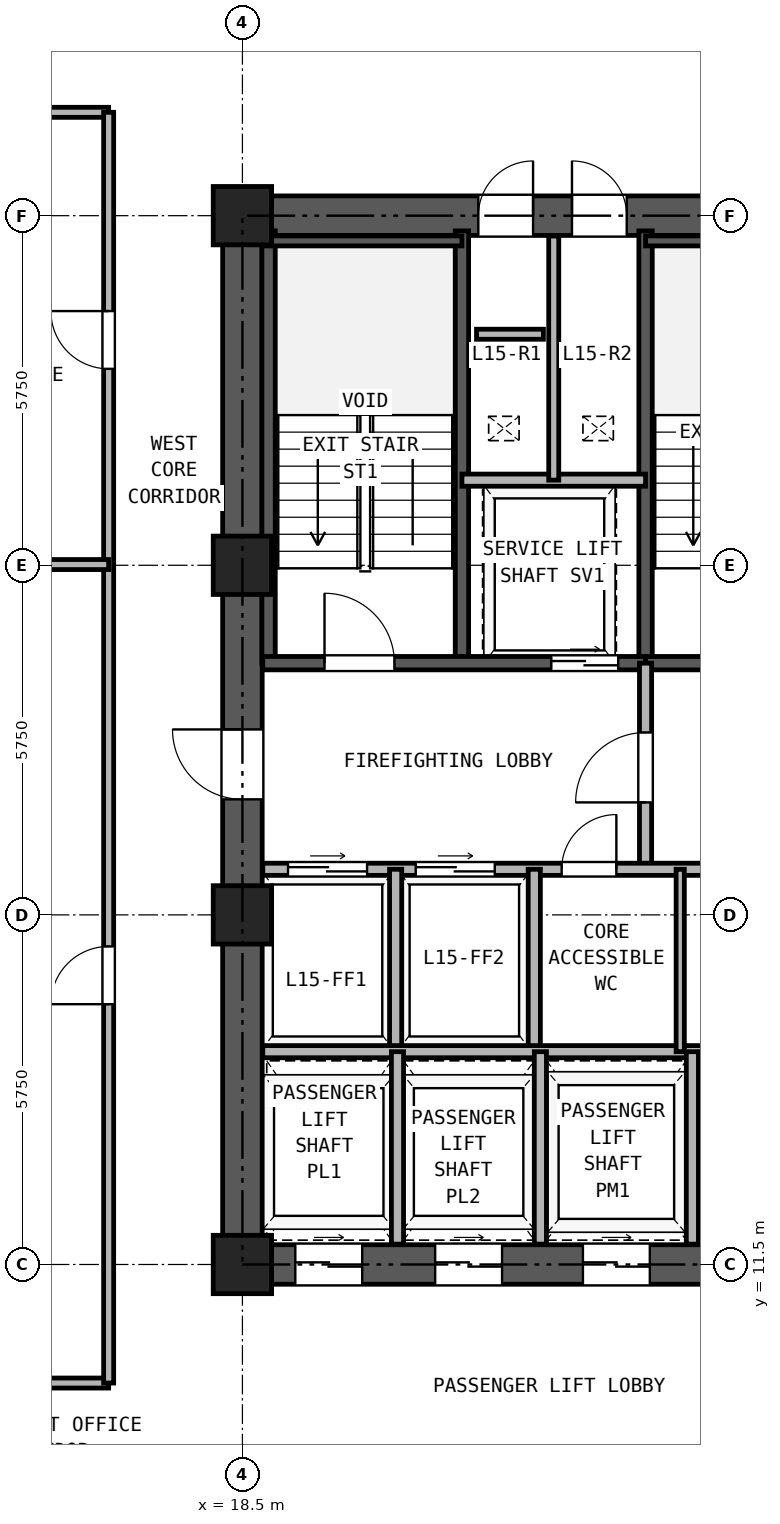
"""IFC4 building model, lengths in metres.
Left out: names, types, materials, properties, quantities, classifications, styles, units other than length and angle.
Written with IfcOpenShell. Run it as: python <this file> out.ifc"""

import sys

from ifc_helpers import new_model, si_unit, direction, frame, frame_2d, origin, origin_2d, place, context, subcontext, project, spatial, rectangle, hollow_rectangle, extrude, source, transform, mapped, element, fill, save


model = new_model("IFC4")
c1 = context("Model", 3, precision=1e-05, world=origin(), true_north=direction((0.0, 1.0)))
c2 = subcontext(c1, "Body", "Model", "MODEL_VIEW")
j1 = project(units=[si_unit("LENGTHUNIT", "METRE"), si_unit("PLANEANGLEUNIT", "RADIAN")], contexts=[c1])
p1 = place(None, origin())
s1 = spatial("IfcSite", under=j1, at=p1, CompositionType="ELEMENT")
p2 = place(p1, origin())
s2 = spatial("IfcBuilding", under=s1, at=p2, CompositionType="ELEMENT")
p3 = place(p2, frame((0.0, 0.0, 58.5)))
s3 = spatial("IfcBuildingStorey", under=s2, at=p3, CompositionType="ELEMENT", Elevation=58.5)
m1 = source(origin(), c2, "Body", "SweptSolid", [
    extrude(hollow_rectangle(XDim=0.96, YDim=0.96, WallThickness=0.06, at=origin_2d()), origin(), (0.0, 0.0, 1.0), 3.32),
])
for number, where, z_axis, x_axis in (
    (1, (18.5, 11.5, 0.0), (0.0, 0.0, 1.0), (1.0, 0.0, 0.0)),
    (2, (18.5, 17.25, 0.0), (0.0, 0.0, 1.0), (1.0, 0.0, 0.0)),
    (3, (18.5, 23.0, 0.0), (0.0, 0.0, 1.0), (1.0, 0.0, 0.0)),
    (4, (18.5, 28.75, 0.0), (0.0, 0.0, 1.0), (1.0, 0.0, 0.0)),
):
    element("IfcColumn", number, at=place(p3, frame(where, z_axis=z_axis, x_axis=x_axis)), inside=s3, PredefinedType="COLUMN", context=c2, shape_type="MappedRepresentation", body=[
        mapped(m1, transform((0.0, 0.0, 0.0), x_axis=(1.0, 0.0, 0.0), y_axis=(0.0, 1.0, 0.0), z_axis=(0.0, 0.0, 1.0), scale=1.0)),
    ])
p4 = place(p3, frame((18.175, 11.5, 0.0), z_axis=(0.0, 0.0, 1.0), x_axis=(1.0, 0.0, 0.0)))
e5 = element("IfcWall", 5, at=p4, inside=s3, PredefinedType="SHEAR", context=c2, shape_type="SweptSolid", body=[
    extrude(rectangle(XDim=10.65, YDim=0.65, at=frame_2d((5.325, 0.0))), origin(), (0.0, 0.0, 1.0), 3.32),
])
p5 = place(p4, frame((1.195, 0.0, 0.0)))
e6 = element("IfcOpeningElement", 6, at=p5, cuts=e5, PredefinedType="OPENING", context=c2, shape_type="SweptSolid", body=[
    extrude(rectangle(XDim=1.1, YDim=2.25, at=frame_2d((0.55, 1.125))), frame((0.0, 0.335, 0.0), z_axis=(0.0, -1.0, 0.0), x_axis=(1.0, 0.0, 0.0)), (0.0, 0.0, 1.0), 0.67),
])
p6 = place(p4, frame((3.495, 0.0, 0.0)))
e7 = element("IfcOpeningElement", 7, at=p6, cuts=e5, PredefinedType="OPENING", context=c2, shape_type="SweptSolid", body=[
    extrude(rectangle(XDim=1.1, YDim=2.25, at=frame_2d((0.55, 1.125))), frame((0.0, 0.335, 0.0), z_axis=(0.0, -1.0, 0.0), x_axis=(1.0, 0.0, 0.0)), (0.0, 0.0, 1.0), 0.67),
])
p7 = place(p4, frame((5.925, 0.0, 0.0)))
e8 = element("IfcOpeningElement", 8, at=p7, cuts=e5, PredefinedType="OPENING", context=c2, shape_type="SweptSolid", body=[
    extrude(rectangle(XDim=1.1, YDim=2.25, at=frame_2d((0.55, 1.125))), frame((0.0, 0.335, 0.0), z_axis=(0.0, -1.0, 0.0), x_axis=(1.0, 0.0, 0.0)), (0.0, 0.0, 1.0), 0.67),
])
p8 = place(p4, frame((8.325, 0.0, 0.0)))
e9 = element("IfcOpeningElement", 9, at=p8, cuts=e5, PredefinedType="OPENING", context=c2, shape_type="SweptSolid", body=[
    extrude(rectangle(XDim=1.1, YDim=2.25, at=frame_2d((0.55, 1.125))), frame((0.0, 0.335, 0.0), z_axis=(0.0, -1.0, 0.0), x_axis=(1.0, 0.0, 0.0)), (0.0, 0.0, 1.0), 0.67),
])
p9 = place(p3, frame((18.175, 28.75, 0.0), z_axis=(0.0, 0.0, 1.0), x_axis=(1.0, 0.0, 0.0)))
e10 = element("IfcWall", 10, at=p9, inside=s3, PredefinedType="SHEAR", context=c2, shape_type="SweptSolid", body=[
    extrude(rectangle(XDim=10.65, YDim=0.65, at=frame_2d((5.325, 0.0))), origin(), (0.0, 0.0, 1.0), 3.32),
])
p10 = place(p9, frame((4.205, 0.0, 0.0)))
e11 = element("IfcOpeningElement", 11, at=p10, cuts=e10, PredefinedType="OPENING", context=c2, shape_type="SweptSolid", body=[
    extrude(rectangle(XDim=0.9, YDim=2.05, at=frame_2d((0.45, 1.025))), frame((0.0, 0.335, 0.0), z_axis=(0.0, -1.0, 0.0), x_axis=(1.0, 0.0, 0.0)), (0.0, 0.0, 1.0), 0.67),
])
p11 = place(p9, frame((5.745, 0.0, 0.0)))
e12 = element("IfcOpeningElement", 12, at=p11, cuts=e10, PredefinedType="OPENING", context=c2, shape_type="SweptSolid", body=[
    extrude(rectangle(XDim=0.9, YDim=2.05, at=frame_2d((0.45, 1.025))), frame((0.0, 0.335, 0.0), z_axis=(0.0, -1.0, 0.0), x_axis=(1.0, 0.0, 0.0)), (0.0, 0.0, 1.0), 0.67),
])
p12 = place(p3, frame((18.5, 11.825, 0.0), z_axis=(0.0, 0.0, 1.0), x_axis=(0.0, 1.0, 0.0)))
e13 = element("IfcWall", 13, at=p12, inside=s3, PredefinedType="SHEAR", context=c2, shape_type="SweptSolid", body=[
    extrude(rectangle(XDim=16.6, YDim=0.65, at=frame_2d((8.3, 0.0))), origin(), (0.0, 0.0, 1.0), 3.32),
])
p13 = place(p12, frame((7.325, 0.0, 0.0)))
e14 = element("IfcOpeningElement", 14, at=p13, cuts=e13, PredefinedType="OPENING", context=c2, shape_type="SweptSolid", body=[
    extrude(rectangle(XDim=1.15, YDim=2.2, at=frame_2d((0.575, 1.1))), frame((0.0, 0.335, 0.0), z_axis=(0.0, -1.0, 0.0), x_axis=(1.0, 0.0, 0.0)), (0.0, 0.0, 1.0), 0.67),
])
for number, where, z_axis, x_axis in (
    (15, (18.93, 21.39, 0.0), (0.0, 0.0, 1.0), (0.0, 1.0, 0.0)),
    (16, (22.11, 21.39, 0.0), (0.0, 0.0, 1.0), (0.0, 1.0, 0.0)),
    (17, (25.13, 21.39, 0.0), (0.0, 0.0, 1.0), (0.0, 1.0, 0.0)),
):
    element("IfcWall", number, at=place(p3, frame(where, z_axis=z_axis, x_axis=x_axis)), inside=s3, PredefinedType="SOLIDWALL", context=c2, shape_type="SweptSolid", body=[
        extrude(rectangle(XDim=7.11, YDim=0.22, at=frame_2d((3.555, 0.0))), origin(), (0.0, 0.0, 1.0), 3.32),
    ])
p14 = place(p3, frame((18.835, 28.335, 0.0), z_axis=(0.0, 0.0, 1.0), x_axis=(1.0, 0.0, 0.0)))
e18 = element("IfcWall", 18, at=p14, inside=s3, PredefinedType="PARTITIONING", context=c2, shape_type="SweptSolid", body=[
    extrude(rectangle(XDim=3.275, YDim=0.165, at=frame_2d((1.638, 0.0))), origin(), (0.0, 0.0, 1.0), 3.32),
])
p15 = place(p3, frame((25.13, 28.335, 0.0), z_axis=(0.0, 0.0, 1.0), x_axis=(1.0, 0.0, 0.0)))
e19 = element("IfcWall", 19, at=p15, inside=s3, PredefinedType="PARTITIONING", context=c2, shape_type="SweptSolid", body=[
    extrude(rectangle(XDim=3.035, YDim=0.165, at=frame_2d((1.518, 0.0))), origin(), (0.0, 0.0, 1.0), 3.32),
])
p16 = place(p3, frame((18.835, 21.39, 0.0), z_axis=(0.0, 0.0, 1.0), x_axis=(1.0, 0.0, 0.0)))
e20 = element("IfcWall", 20, at=p16, inside=s3, PredefinedType="SOLIDWALL", context=c2, shape_type="SweptSolid", body=[
    extrude(rectangle(XDim=6.295, YDim=0.22, at=frame_2d((3.147, 0.0))), origin(), (0.0, 0.0, 1.0), 3.32),
])
p17 = place(p16, frame((1.015, 0.0, 0.0)))
e21 = element("IfcOpeningElement", 21, at=p17, cuts=e20, PredefinedType="OPENING", context=c2, shape_type="SweptSolid", body=[
    extrude(rectangle(XDim=1.15, YDim=2.2, at=frame_2d((0.575, 1.1))), frame((0.0, 0.12, 0.0), z_axis=(0.0, -1.0, 0.0), x_axis=(1.0, 0.0, 0.0)), (0.0, 0.0, 1.0), 0.24),
])
p18 = place(p16, frame((4.745, 0.0, 0.0)))
e22 = element("IfcOpeningElement", 22, at=p18, cuts=e20, PredefinedType="OPENING", context=c2, shape_type="SweptSolid", body=[
    extrude(rectangle(XDim=1.1, YDim=2.25, at=frame_2d((0.55, 1.125))), frame((0.0, 0.12, 0.0), z_axis=(0.0, -1.0, 0.0), x_axis=(1.0, 0.0, 0.0)), (0.0, 0.0, 1.0), 0.24),
])
p19 = place(p3, frame((25.13, 21.39, 0.0), z_axis=(0.0, 0.0, 1.0), x_axis=(1.0, 0.0, 0.0)))
e23 = element("IfcWall", 23, at=p19, inside=s3, PredefinedType="SOLIDWALL", context=c2, shape_type="SweptSolid", body=[
    extrude(rectangle(XDim=3.035, YDim=0.22, at=frame_2d((1.518, 0.0))), origin(), (0.0, 0.0, 1.0), 3.32),
])
p20 = place(p19, frame((0.92, 0.0, 0.0)))
e24 = element("IfcOpeningElement", 24, at=p20, cuts=e23, PredefinedType="OPENING", context=c2, shape_type="SweptSolid", body=[
    extrude(rectangle(XDim=1.15, YDim=2.2, at=frame_2d((0.575, 1.1))), frame((0.0, 0.12, 0.0), z_axis=(0.0, -1.0, 0.0), x_axis=(1.0, 0.0, 0.0)), (0.0, 0.0, 1.0), 0.24),
])
p21 = place(p3, frame((22.11, 24.4, 0.0), z_axis=(0.0, 0.0, 1.0), x_axis=(1.0, 0.0, 0.0)))
e25 = element("IfcWall", 25, at=p21, inside=s3, PredefinedType="PARTITIONING", context=c2, shape_type="SweptSolid", body=[
    extrude(rectangle(XDim=3.02, YDim=0.2, at=frame_2d((1.51, 0.0))), origin(), (0.0, 0.0, 1.0), 3.32),
])
p22 = place(p3, frame((23.62, 24.4, 0.0), z_axis=(0.0, 0.0, 1.0), x_axis=(0.0, 1.0, 0.0)))
e26 = element("IfcWall", 26, at=p22, inside=s3, PredefinedType="PARTITIONING", context=c2, shape_type="SweptSolid", body=[
    extrude(rectangle(XDim=4.015, YDim=0.165, at=frame_2d((2.008, 0.0))), origin(), (0.0, 0.0, 1.0), 3.32),
])
p23 = place(p3, frame((25.13, 18.0, 0.0), z_axis=(0.0, 0.0, 1.0), x_axis=(0.0, 1.0, 0.0)))
e27 = element("IfcWall", 27, at=p23, inside=s3, PredefinedType="PARTITIONING", context=c2, shape_type="SweptSolid", body=[
    extrude(rectangle(XDim=3.39, YDim=0.2, at=frame_2d((1.695, 0.0))), origin(), (0.0, 0.0, 1.0), 3.32),
])
p24 = place(p23, frame((1.1, 0.0, 0.0)))
e28 = element("IfcOpeningElement", 28, at=p24, cuts=e27, PredefinedType="OPENING", context=c2, shape_type="SweptSolid", body=[
    extrude(rectangle(XDim=1.15, YDim=2.2, at=frame_2d((0.575, 1.1))), frame((0.0, 0.11, 0.0), z_axis=(0.0, -1.0, 0.0), x_axis=(1.0, 0.0, 0.0)), (0.0, 0.0, 1.0), 0.22),
])
p25 = place(p3, frame((18.835, 18.0, 0.0), z_axis=(0.0, 0.0, 1.0), x_axis=(1.0, 0.0, 0.0)))
e29 = element("IfcWall", 29, at=p25, inside=s3, PredefinedType="PARTITIONING", context=c2, shape_type="SweptSolid", body=[
    extrude(rectangle(XDim=9.33, YDim=0.2, at=frame_2d((4.665, 0.0))), origin(), (0.0, 0.0, 1.0), 3.32),
])
p26 = place(p25, frame((0.415, 0.0, 0.0)))
e30 = element("IfcOpeningElement", 30, at=p26, cuts=e29, PredefinedType="OPENING", context=c2, shape_type="SweptSolid", body=[
    extrude(rectangle(XDim=1.3, YDim=2.3, at=frame_2d((0.65, 1.15))), frame((0.0, 0.11, 0.0), z_axis=(0.0, -1.0, 0.0), x_axis=(1.0, 0.0, 0.0)), (0.0, 0.0, 1.0), 0.22),
])
p27 = place(p25, frame((2.515, 0.0, 0.0)))
e31 = element("IfcOpeningElement", 31, at=p27, cuts=e29, PredefinedType="OPENING", context=c2, shape_type="SweptSolid", body=[
    extrude(rectangle(XDim=1.3, YDim=2.3, at=frame_2d((0.65, 1.15))), frame((0.0, 0.11, 0.0), z_axis=(0.0, -1.0, 0.0), x_axis=(1.0, 0.0, 0.0)), (0.0, 0.0, 1.0), 0.22),
])
p28 = place(p25, frame((4.915, 0.0, 0.0)))
e32 = element("IfcOpeningElement", 32, at=p28, cuts=e29, PredefinedType="OPENING", context=c2, shape_type="SweptSolid", body=[
    extrude(rectangle(XDim=0.9, YDim=2.05, at=frame_2d((0.45, 1.025))), frame((0.0, 0.11, 0.0), z_axis=(0.0, -1.0, 0.0), x_axis=(1.0, 0.0, 0.0)), (0.0, 0.0, 1.0), 0.22),
])
p29 = place(p25, frame((7.615, 0.0, 0.0)))
e33 = element("IfcOpeningElement", 33, at=p29, cuts=e29, PredefinedType="OPENING", context=c2, shape_type="SweptSolid", body=[
    extrude(rectangle(XDim=0.9, YDim=2.05, at=frame_2d((0.45, 1.025))), frame((0.0, 0.11, 0.0), z_axis=(0.0, -1.0, 0.0), x_axis=(1.0, 0.0, 0.0)), (0.0, 0.0, 1.0), 0.22),
])
for number, where, z_axis, x_axis in (
    (34, (21.02, 15.0, 0.0), (0.0, 0.0, 1.0), (0.0, 1.0, 0.0)),
    (35, (23.3, 15.0, 0.0), (0.0, 0.0, 1.0), (0.0, 1.0, 0.0)),
):
    element("IfcWall", number, at=place(p3, frame(where, z_axis=z_axis, x_axis=x_axis)), inside=s3, PredefinedType="PARTITIONING", context=c2, shape_type="SweptSolid", body=[
        extrude(rectangle(XDim=3.0, YDim=0.2, at=frame_2d((1.5, 0.0))), origin(), (0.0, 0.0, 1.0), 3.32),
    ])
p30 = place(p3, frame((18.835, 15.0, 0.0), z_axis=(0.0, 0.0, 1.0), x_axis=(1.0, 0.0, 0.0)))
e36 = element("IfcWall", 36, at=p30, inside=s3, PredefinedType="PARTITIONING", context=c2, shape_type="SweptSolid", body=[
    extrude(rectangle(XDim=9.33, YDim=0.2, at=frame_2d((4.665, 0.0))), origin(), (0.0, 0.0, 1.0), 3.32),
])
p31 = place(p3, frame((25.7, 15.0, 0.0), z_axis=(0.0, 0.0, 1.0), x_axis=(0.0, 1.0, 0.0)))
e37 = element("IfcWall", 37, at=p31, inside=s3, PredefinedType="PARTITIONING", context=c2, shape_type="SweptSolid", body=[
    extrude(rectangle(XDim=3.0, YDim=0.135, at=frame_2d((1.5, 0.0))), origin(), (0.0, 0.0, 1.0), 3.32),
])
for number, where, z_axis, x_axis in (
    (38, (21.05, 11.835, 0.0), (0.0, 0.0, 1.0), (0.0, 1.0, 0.0)),
    (39, (23.4, 11.835, 0.0), (0.0, 0.0, 1.0), (0.0, 1.0, 0.0)),
    (40, (25.9, 11.835, 0.0), (0.0, 0.0, 1.0), (0.0, 1.0, 0.0)),
):
    element("IfcWall", number, at=place(p3, frame(where, z_axis=z_axis, x_axis=x_axis)), inside=s3, PredefinedType="PARTITIONING", context=c2, shape_type="SweptSolid", body=[
        extrude(rectangle(XDim=3.165, YDim=0.2, at=frame_2d((1.583, 0.0))), origin(), (0.0, 0.0, 1.0), 3.32),
    ])
for number, where, z_axis, x_axis in (
    (41, (12.0, 9.55, 0.0), (0.0, 0.0, 1.0), (1.0, 0.0, 0.0)),
    (42, (12.0, 30.45, 0.0), (0.0, 0.0, 1.0), (1.0, 0.0, 0.0)),
):
    element("IfcWall", number, at=place(p3, frame(where, z_axis=z_axis, x_axis=x_axis)), inside=s3, PredefinedType="PARTITIONING", context=c2, shape_type="SweptSolid", body=[
        extrude(rectangle(XDim=4.3, YDim=0.165, at=frame_2d((2.15, 0.0))), origin(), (0.0, 0.0, 1.0), 3.32),
    ])
p32 = place(p3, frame((16.3, 9.55, 0.0), z_axis=(0.0, 0.0, 1.0), x_axis=(0.0, 1.0, 0.0)))
e43 = element("IfcWall", 43, at=p32, inside=s3, PredefinedType="PARTITIONING", context=c2, shape_type="SweptSolid", body=[
    extrude(rectangle(XDim=20.9, YDim=0.165, at=frame_2d((10.45, 0.0))), origin(), (0.0, 0.0, 1.0), 3.32),
])
p33 = place(p32, frame((6.231, 0.0, 0.0)))
e44 = element("IfcOpeningElement", 44, at=p33, cuts=e43, PredefinedType="OPENING", context=c2, shape_type="SweptSolid", body=[
    extrude(rectangle(XDim=0.95, YDim=2.15, at=frame_2d((0.475, 1.075))), frame((0.0, 0.093, 0.0), z_axis=(0.0, -1.0, 0.0), x_axis=(1.0, 0.0, 0.0)), (0.0, 0.0, 1.0), 0.185),
])
p34 = place(p32, frame((16.681, 0.0, 0.0)))
e45 = element("IfcOpeningElement", 45, at=p34, cuts=e43, PredefinedType="OPENING", context=c2, shape_type="SweptSolid", body=[
    extrude(rectangle(XDim=0.95, YDim=2.15, at=frame_2d((0.475, 1.075))), frame((0.0, 0.093, 0.0), z_axis=(0.0, -1.0, 0.0), x_axis=(1.0, 0.0, 0.0)), (0.0, 0.0, 1.0), 0.185),
])
p35 = place(p3, frame((12.0, 23.012, 0.0), z_axis=(0.0, 0.0, 1.0), x_axis=(1.0, 0.0, 0.0)))
e46 = element("IfcWall", 46, at=p35, inside=s3, PredefinedType="PARTITIONING", context=c2, shape_type="SweptSolid", body=[
    extrude(rectangle(XDim=4.3, YDim=0.165, at=frame_2d((2.15, 0.0))), origin(), (0.0, 0.0, 1.0), 2.539),
])
p36 = place(p3, frame((22.35, 26.8, 0.0), z_axis=(0.0, 0.0, 1.0), x_axis=(1.0, 0.0, 0.0)))
e47 = element("IfcWall", 47, at=p36, inside=s3, PredefinedType="PARTITIONING", context=c2, shape_type="SweptSolid", body=[
    extrude(rectangle(XDim=1.1, YDim=0.165, at=frame_2d((0.55, 0.0))), origin(), (0.0, 0.0, 1.0), 3.32),
])
p37 = place(p17, frame((1.15, 0.0, 0.0), z_axis=(0.0, 0.0, 1.0), x_axis=(-1.0, 0.0, 0.0)))
e48 = element("IfcDoor", 48, at=p37, inside=s3, OperationType="SINGLE_SWING_LEFT", PredefinedType="DOOR", context=c2, shape_type="SweptSolid", body=[
    extrude(rectangle(XDim=1.15, YDim=2.2, at=frame_2d((0.575, 1.1))), frame((0.0, 0.025, 0.0), z_axis=(0.0, -1.0, 0.0), x_axis=(1.0, 0.0, 0.0)), (0.0, 0.0, 1.0), 0.05),
])
fill(e21, e48)
p38 = place(p18, frame((1.1, 0.0, 0.0), z_axis=(0.0, 0.0, 1.0), x_axis=(-1.0, 0.0, 0.0)))
e49 = element("IfcDoor", 49, at=p38, inside=s3, OperationType="DOUBLE_DOOR_SLIDING", PredefinedType="DOOR", context=c2, shape_type="SweptSolid", body=[
    extrude(rectangle(XDim=1.1, YDim=2.25, at=frame_2d((0.55, 1.125))), frame((0.0, 0.025, 0.0), z_axis=(0.0, -1.0, 0.0), x_axis=(1.0, 0.0, 0.0)), (0.0, 0.0, 1.0), 0.05),
])
fill(e22, e49)
p39 = place(p24, origin())
e50 = element("IfcDoor", 50, at=p39, inside=s3, OperationType="SINGLE_SWING_LEFT", PredefinedType="DOOR", context=c2, shape_type="SweptSolid", body=[
    extrude(rectangle(XDim=1.15, YDim=2.2, at=frame_2d((0.575, 1.1))), frame((0.0, 0.025, 0.0), z_axis=(0.0, -1.0, 0.0), x_axis=(1.0, 0.0, 0.0)), (0.0, 0.0, 1.0), 0.05),
])
fill(e28, e50)
p40 = place(p26, origin())
e51 = element("IfcDoor", 51, at=p40, inside=s3, OperationType="DOUBLE_DOOR_SLIDING", PredefinedType="DOOR", context=c2, shape_type="SweptSolid", body=[
    extrude(rectangle(XDim=1.3, YDim=2.3, at=frame_2d((0.65, 1.15))), frame((0.0, 0.025, 0.0), z_axis=(0.0, -1.0, 0.0), x_axis=(1.0, 0.0, 0.0)), (0.0, 0.0, 1.0), 0.05),
])
fill(e30, e51)
p41 = place(p27, origin())
e52 = element("IfcDoor", 52, at=p41, inside=s3, OperationType="DOUBLE_DOOR_SLIDING", PredefinedType="DOOR", context=c2, shape_type="SweptSolid", body=[
    extrude(rectangle(XDim=1.3, YDim=2.3, at=frame_2d((0.65, 1.15))), frame((0.0, 0.025, 0.0), z_axis=(0.0, -1.0, 0.0), x_axis=(1.0, 0.0, 0.0)), (0.0, 0.0, 1.0), 0.05),
])
fill(e31, e52)
p42 = place(p28, frame((0.9, 0.0, 0.0), z_axis=(0.0, 0.0, 1.0), x_axis=(-1.0, 0.0, 0.0)))
e53 = element("IfcDoor", 53, at=p42, inside=s3, OperationType="SINGLE_SWING_RIGHT", PredefinedType="DOOR", context=c2, shape_type="SweptSolid", body=[
    extrude(rectangle(XDim=0.9, YDim=2.05, at=frame_2d((0.45, 1.025))), frame((0.0, 0.025, 0.0), z_axis=(0.0, -1.0, 0.0), x_axis=(1.0, 0.0, 0.0)), (0.0, 0.0, 1.0), 0.05),
])
fill(e32, e53)
p43 = place(p13, frame((1.15, 0.0, 0.0), z_axis=(0.0, 0.0, 1.0), x_axis=(-1.0, 0.0, 0.0)))
e54 = element("IfcDoor", 54, at=p43, inside=s3, OperationType="SINGLE_SWING_RIGHT", PredefinedType="DOOR", context=c2, shape_type="SweptSolid", body=[
    extrude(rectangle(XDim=1.15, YDim=2.2, at=frame_2d((0.575, 1.1))), frame((0.0, 0.025, 0.0), z_axis=(0.0, -1.0, 0.0), x_axis=(1.0, 0.0, 0.0)), (0.0, 0.0, 1.0), 0.05),
])
fill(e14, e54)
p44 = place(p10, origin())
e55 = element("IfcDoor", 55, at=p44, inside=s3, OperationType="SINGLE_SWING_RIGHT", PredefinedType="DOOR", context=c2, shape_type="SweptSolid", body=[
    extrude(rectangle(XDim=0.9, YDim=2.05, at=frame_2d((0.45, 1.025))), frame((0.0, 0.025, 0.0), z_axis=(0.0, -1.0, 0.0), x_axis=(1.0, 0.0, 0.0)), (0.0, 0.0, 1.0), 0.05),
])
fill(e11, e55)
p45 = place(p11, origin())
e56 = element("IfcDoor", 56, at=p45, inside=s3, OperationType="SINGLE_SWING_LEFT", PredefinedType="DOOR", context=c2, shape_type="SweptSolid", body=[
    extrude(rectangle(XDim=0.9, YDim=2.05, at=frame_2d((0.45, 1.025))), frame((0.0, 0.025, 0.0), z_axis=(0.0, -1.0, 0.0), x_axis=(1.0, 0.0, 0.0)), (0.0, 0.0, 1.0), 0.05),
])
fill(e12, e56)
p46 = place(p5, frame((1.1, 0.0, 0.0), z_axis=(0.0, 0.0, 1.0), x_axis=(-1.0, 0.0, 0.0)))
e57 = element("IfcDoor", 57, at=p46, inside=s3, OperationType="DOUBLE_DOOR_SLIDING", PredefinedType="DOOR", context=c2, shape_type="SweptSolid", body=[
    extrude(rectangle(XDim=1.1, YDim=2.25, at=frame_2d((0.55, 1.125))), frame((0.0, 0.025, 0.0), z_axis=(0.0, -1.0, 0.0), x_axis=(1.0, 0.0, 0.0)), (0.0, 0.0, 1.0), 0.05),
])
fill(e6, e57)
p47 = place(p6, frame((1.1, 0.0, 0.0), z_axis=(0.0, 0.0, 1.0), x_axis=(-1.0, 0.0, 0.0)))
e58 = element("IfcDoor", 58, at=p47, inside=s3, OperationType="DOUBLE_DOOR_SLIDING", PredefinedType="DOOR", context=c2, shape_type="SweptSolid", body=[
    extrude(rectangle(XDim=1.1, YDim=2.25, at=frame_2d((0.55, 1.125))), frame((0.0, 0.025, 0.0), z_axis=(0.0, -1.0, 0.0), x_axis=(1.0, 0.0, 0.0)), (0.0, 0.0, 1.0), 0.05),
])
fill(e7, e58)
p48 = place(p7, frame((1.1, 0.0, 0.0), z_axis=(0.0, 0.0, 1.0), x_axis=(-1.0, 0.0, 0.0)))
e59 = element("IfcDoor", 59, at=p48, inside=s3, OperationType="DOUBLE_DOOR_SLIDING", PredefinedType="DOOR", context=c2, shape_type="SweptSolid", body=[
    extrude(rectangle(XDim=1.1, YDim=2.25, at=frame_2d((0.55, 1.125))), frame((0.0, 0.025, 0.0), z_axis=(0.0, -1.0, 0.0), x_axis=(1.0, 0.0, 0.0)), (0.0, 0.0, 1.0), 0.05),
])
fill(e8, e59)
p49 = place(p33, frame((0.95, 0.0, 0.0), z_axis=(0.0, 0.0, 1.0), x_axis=(-1.0, 0.0, 0.0)))
e60 = element("IfcDoor", 60, at=p49, inside=s3, OperationType="SINGLE_SWING_LEFT", PredefinedType="DOOR", context=c2, shape_type="SweptSolid", body=[
    extrude(rectangle(XDim=0.95, YDim=2.15, at=frame_2d((0.475, 1.075))), frame((0.0, 0.025, 0.0), z_axis=(0.0, -1.0, 0.0), x_axis=(1.0, 0.0, 0.0)), (0.0, 0.0, 1.0), 0.05),
])
fill(e44, e60)
p50 = place(p34, frame((0.95, 0.0, 0.0), z_axis=(0.0, 0.0, 1.0), x_axis=(-1.0, 0.0, 0.0)))
e61 = element("IfcDoor", 61, at=p50, inside=s3, OperationType="SINGLE_SWING_RIGHT", PredefinedType="DOOR", context=c2, shape_type="SweptSolid", body=[
    extrude(rectangle(XDim=0.95, YDim=2.15, at=frame_2d((0.475, 1.075))), frame((0.0, 0.025, 0.0), z_axis=(0.0, -1.0, 0.0), x_axis=(1.0, 0.0, 0.0)), (0.0, 0.0, 1.0), 0.05),
])
fill(e45, e61)
save(model, sys.argv[1])
